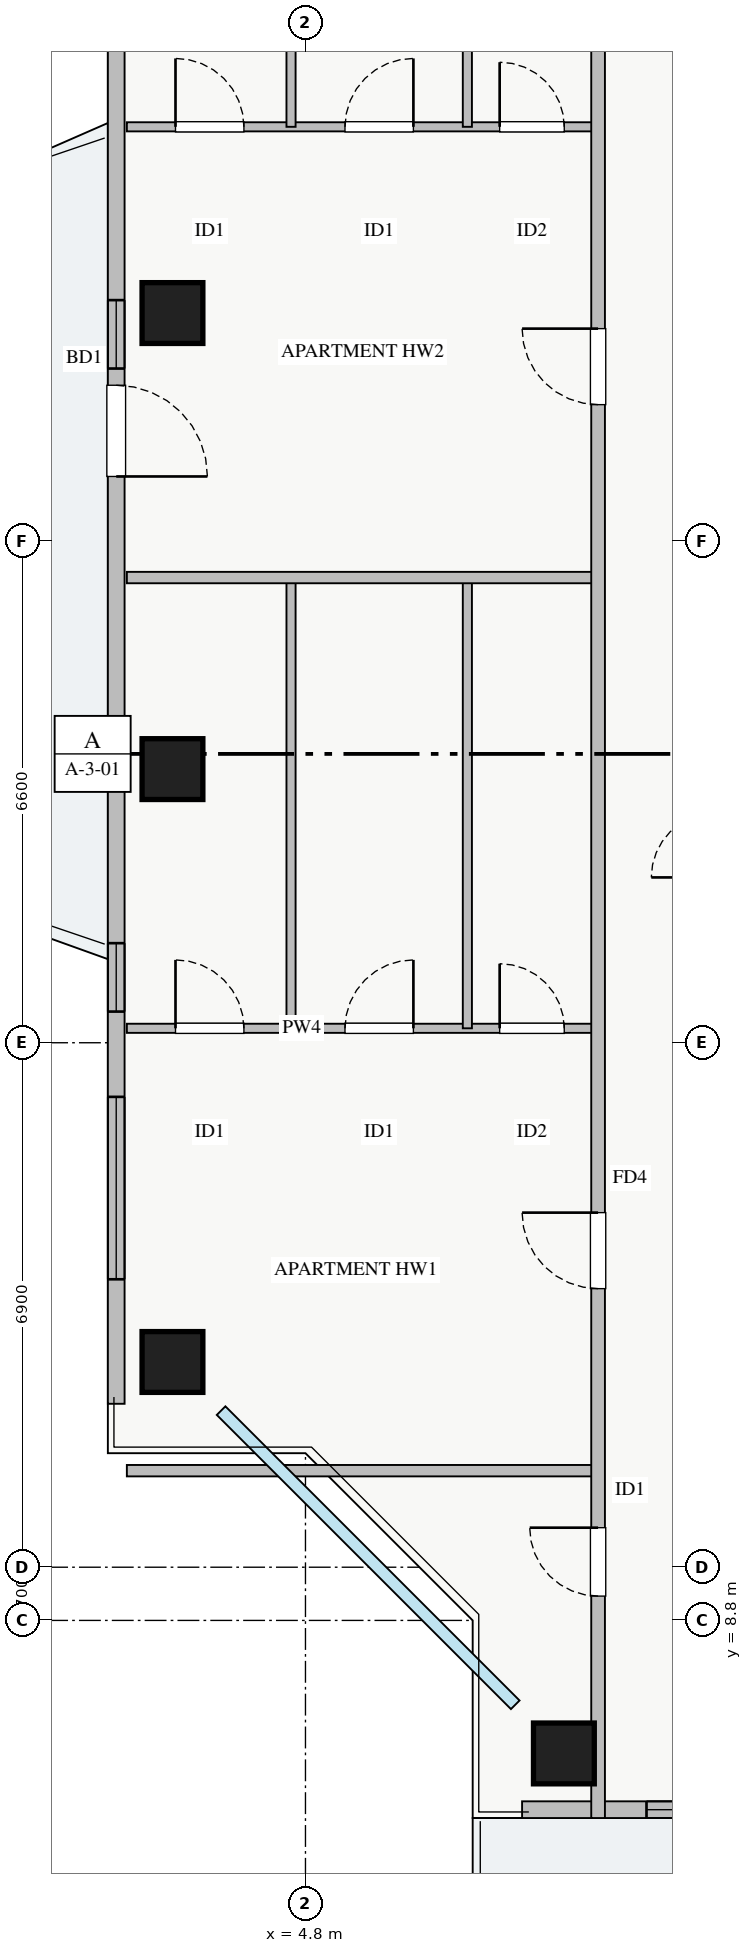
"""IFC4 building model, lengths in metres.
Left out: names, types, materials, properties, quantities, classifications, styles, units other than length and angle.
Written with IfcOpenShell. Run it as: python <this file> out.ifc"""

import sys

from ifc_helpers import new_model, si_unit, direction, frame, frame_2d, origin, origin_2d, place, context, subcontext, project, spatial, rectangle, extrude, source, transform, mapped, element, fill, save


model = new_model("IFC4")
c1 = context("Model", 3, precision=1e-05, world=origin(), true_north=direction((0.0, 1.0)))
c2 = subcontext(c1, "Body", "Model", "MODEL_VIEW")
j1 = project(units=[si_unit("LENGTHUNIT", "METRE"), si_unit("PLANEANGLEUNIT", "RADIAN")], contexts=[c1])
p1 = place(None, origin())
s1 = spatial("IfcSite", under=j1, at=p1, CompositionType="ELEMENT")
p2 = place(p1, origin())
s2 = spatial("IfcBuilding", under=s1, at=p2, CompositionType="ELEMENT")
p3 = place(p2, frame((0.0, 0.0, 190.5)))
s3 = spatial("IfcBuildingStorey", under=s2, at=p3, CompositionType="ELEMENT", Elevation=190.5)
m1 = source(origin(), c2, "Body", "SweptSolid", [
    extrude(rectangle(XDim=0.8, YDim=0.8, at=origin_2d()), origin(), (0.0, 0.0, 1.0), 3.25),
])
for number, where, z_axis, x_axis in (
    (1, (8.2, 7.05, 0.0), (0.0, 0.0, 1.0), (1.0, 0.0, 0.0)),
    (2, (3.05, 26.0, 0.0), (0.0, 0.0, 1.0), (1.0, 0.0, 0.0)),
    (3, (3.05, 20.0, 0.0), (0.0, 0.0, 1.0), (1.0, 0.0, 0.0)),
    (4, (3.05, 12.2, 0.0), (0.0, 0.0, 1.0), (1.0, 0.0, 0.0)),
):
    element("IfcColumn", number, at=place(p3, frame(where, z_axis=z_axis, x_axis=x_axis)), inside=s3, PredefinedType="COLUMN", context=c2, shape_type="MappedRepresentation", body=[
        mapped(m1, transform((0.0, 0.0, 0.0), x_axis=(1.0, 0.0, 0.0), y_axis=(0.0, 1.0, 0.0), z_axis=(0.0, 0.0, 1.0), scale=1.0)),
    ])
p4 = place(p3, frame((7.65, 6.31, 0.0), z_axis=(0.0, 0.0, 1.0), x_axis=(1.0, 0.0, 0.0)))
e5 = element("IfcWall", 5, at=p4, inside=s3, PredefinedType="STANDARD", context=c2, shape_type="SweptSolid", body=[
    extrude(rectangle(XDim=22.7, YDim=0.22, at=frame_2d((11.35, 0.0))), origin(), (0.0, 0.0, 1.0), 2.61),
])
p5 = place(p4, frame((12.2, 0.0, 0.0)))
e6 = element("IfcOpeningElement", 6, at=p5, cuts=e5, PredefinedType="OPENING", context=c2, shape_type="SweptSolid", body=[
    extrude(rectangle(XDim=1.2, YDim=2.1, at=frame_2d((0.6, 1.05))), frame((0.0, 0.12, 0.0), z_axis=(0.0, -1.0, 0.0), x_axis=(1.0, 0.0, 0.0)), (0.0, 0.0, 1.0), 0.24),
])
p6 = place(p4, frame((1.637, 0.0, 0.9)))
e7 = element("IfcOpeningElement", 7, at=p6, cuts=e5, PredefinedType="OPENING", context=c2, shape_type="SweptSolid", body=[
    extrude(rectangle(XDim=2.4, YDim=1.48, at=frame_2d((1.2, 0.74))), frame((0.0, 0.12, 0.0), z_axis=(0.0, -1.0, 0.0), x_axis=(1.0, 0.0, 0.0)), (0.0, 0.0, 1.0), 0.24),
])
p7 = place(p4, frame((7.612, 0.0, 0.9)))
e8 = element("IfcOpeningElement", 8, at=p7, cuts=e5, PredefinedType="OPENING", context=c2, shape_type="SweptSolid", body=[
    extrude(rectangle(XDim=1.8, YDim=1.45, at=frame_2d((0.9, 0.725))), frame((0.0, 0.12, 0.0), z_axis=(0.0, -1.0, 0.0), x_axis=(1.0, 0.0, 0.0)), (0.0, 0.0, 1.0), 0.24),
])
p8 = place(p4, frame((19.788, 0.0, 0.9)))
e9 = element("IfcOpeningElement", 9, at=p8, cuts=e5, PredefinedType="OPENING", context=c2, shape_type="SweptSolid", body=[
    extrude(rectangle(XDim=2.1, YDim=1.5, at=frame_2d((1.05, 0.75))), frame((0.0, 0.12, 0.0), z_axis=(0.0, -1.0, 0.0), x_axis=(1.0, 0.0, 0.0)), (0.0, 0.0, 1.0), 0.24),
])
p9 = place(p3, frame((2.31, 11.65, 0.0), z_axis=(0.0, 0.0, 1.0), x_axis=(0.0, 1.0, 0.0)))
e10 = element("IfcWall", 10, at=p9, inside=s3, PredefinedType="STANDARD", context=c2, shape_type="SweptSolid", body=[
    extrude(rectangle(XDim=22.7, YDim=0.22, at=frame_2d((11.35, 0.0))), origin(), (0.0, 0.0, 1.0), 2.61),
])
p10 = place(p9, frame((12.2, 0.0, 0.0)))
e11 = element("IfcOpeningElement", 11, at=p10, cuts=e10, PredefinedType="OPENING", context=c2, shape_type="SweptSolid", body=[
    extrude(rectangle(XDim=1.2, YDim=2.1, at=frame_2d((0.6, 1.05))), frame((0.0, 0.12, 0.0), z_axis=(0.0, -1.0, 0.0), x_axis=(1.0, 0.0, 0.0)), (0.0, 0.0, 1.0), 0.24),
])
p11 = place(p9, frame((1.638, 0.0, 0.9)))
e12 = element("IfcOpeningElement", 12, at=p11, cuts=e10, PredefinedType="OPENING", context=c2, shape_type="SweptSolid", body=[
    extrude(rectangle(XDim=2.4, YDim=1.48, at=frame_2d((1.2, 0.74))), frame((0.0, 0.12, 0.0), z_axis=(0.0, -1.0, 0.0), x_axis=(1.0, 0.0, 0.0)), (0.0, 0.0, 1.0), 0.24),
])
p12 = place(p9, frame((18.813, 0.0, 0.9)))
e13 = element("IfcOpeningElement", 13, at=p12, cuts=e10, PredefinedType="OPENING", context=c2, shape_type="SweptSolid", body=[
    extrude(rectangle(XDim=2.1, YDim=1.48, at=frame_2d((1.05, 0.74))), frame((0.0, 0.12, 0.0), z_axis=(0.0, -1.0, 0.0), x_axis=(1.0, 0.0, 0.0)), (0.0, 0.0, 1.0), 0.24),
])
p13 = place(p9, frame((5.16, 0.0, 0.9)))
e14 = element("IfcOpeningElement", 14, at=p13, cuts=e10, PredefinedType="OPENING", context=c2, shape_type="SweptSolid", body=[
    extrude(rectangle(XDim=0.9, YDim=1.2, at=frame_2d((0.45, 0.6))), frame((0.0, 0.12, 0.0), z_axis=(0.0, -1.0, 0.0), x_axis=(1.0, 0.0, 0.0)), (0.0, 0.0, 1.0), 0.24),
])
p14 = place(p9, frame((13.62, 0.0, 0.9)))
e15 = element("IfcOpeningElement", 15, at=p14, cuts=e10, PredefinedType="OPENING", context=c2, shape_type="SweptSolid", body=[
    extrude(rectangle(XDim=0.9, YDim=1.2, at=frame_2d((0.45, 0.6))), frame((0.0, 0.12, 0.0), z_axis=(0.0, -1.0, 0.0), x_axis=(1.0, 0.0, 0.0)), (0.0, 0.0, 1.0), 0.24),
])
p15 = place(p3, frame((2.45, 10.77, 0.0), z_axis=(0.0, 0.0, 1.0), x_axis=(1.0, 0.0, 0.0)))
e16 = element("IfcWall", 16, at=p15, inside=s3, PredefinedType="PARTITIONING", context=c2, shape_type="SweptSolid", body=[
    extrude(rectangle(XDim=6.2, YDim=0.15, at=frame_2d((3.1, 0.0))), origin(), (0.0, 0.0, 1.0), 3.07),
])
p16 = place(p3, frame((2.45, 16.59, 0.0), z_axis=(0.0, 0.0, 1.0), x_axis=(1.0, 0.0, 0.0)))
e17 = element("IfcWall", 17, at=p16, inside=s3, PredefinedType="PLUMBINGWALL", context=c2, shape_type="SweptSolid", body=[
    extrude(rectangle(XDim=6.2, YDim=0.12, at=frame_2d((3.1, 0.0))), origin(), (0.0, 0.0, 1.0), 3.07),
])
p17 = place(p16, frame((0.64, 0.0, 0.0)))
e18 = element("IfcOpeningElement", 18, at=p17, cuts=e17, PredefinedType="OPENING", context=c2, shape_type="SweptSolid", body=[
    extrude(rectangle(XDim=0.9, YDim=2.05, at=frame_2d((0.45, 1.025))), frame((0.0, 0.07, 0.0), z_axis=(0.0, -1.0, 0.0), x_axis=(1.0, 0.0, 0.0)), (0.0, 0.0, 1.0), 0.14),
])
p18 = place(p16, frame((2.87, 0.0, 0.0)))
e19 = element("IfcOpeningElement", 19, at=p18, cuts=e17, PredefinedType="OPENING", context=c2, shape_type="SweptSolid", body=[
    extrude(rectangle(XDim=0.9, YDim=2.05, at=frame_2d((0.45, 1.025))), frame((0.0, 0.07, 0.0), z_axis=(0.0, -1.0, 0.0), x_axis=(1.0, 0.0, 0.0)), (0.0, 0.0, 1.0), 0.14),
])
p19 = place(p16, frame((4.905, 0.0, 0.0)))
e20 = element("IfcOpeningElement", 20, at=p19, cuts=e17, PredefinedType="OPENING", context=c2, shape_type="SweptSolid", body=[
    extrude(rectangle(XDim=0.85, YDim=2.05, at=frame_2d((0.425, 1.025))), frame((0.0, 0.07, 0.0), z_axis=(0.0, -1.0, 0.0), x_axis=(1.0, 0.0, 0.0)), (0.0, 0.0, 1.0), 0.14),
])
for number, where, z_axis, x_axis in (
    (21, (4.61, 16.59, 0.0), (0.0, 0.0, 1.0), (0.0, 1.0, 0.0)),
    (22, (6.93, 16.59, 0.0), (0.0, 0.0, 1.0), (0.0, 1.0, 0.0)),
):
    element("IfcWall", number, at=place(p3, frame(where, z_axis=z_axis, x_axis=x_axis)), inside=s3, PredefinedType="PLUMBINGWALL", context=c2, shape_type="SweptSolid", body=[
        extrude(rectangle(XDim=5.93, YDim=0.12, at=frame_2d((2.965, 0.0))), origin(), (0.0, 0.0, 1.0), 3.07),
    ])
p20 = place(p3, frame((2.45, 28.45, 0.0), z_axis=(0.0, 0.0, 1.0), x_axis=(1.0, 0.0, 0.0)))
e23 = element("IfcWall", 23, at=p20, inside=s3, PredefinedType="PLUMBINGWALL", context=c2, shape_type="SweptSolid", body=[
    extrude(rectangle(XDim=6.2, YDim=0.12, at=frame_2d((3.1, 0.0))), origin(), (0.0, 0.0, 1.0), 3.07),
])
p21 = place(p20, frame((0.64, 0.0, 0.0)))
e24 = element("IfcOpeningElement", 24, at=p21, cuts=e23, PredefinedType="OPENING", context=c2, shape_type="SweptSolid", body=[
    extrude(rectangle(XDim=0.9, YDim=2.05, at=frame_2d((0.45, 1.025))), frame((0.0, 0.07, 0.0), z_axis=(0.0, -1.0, 0.0), x_axis=(1.0, 0.0, 0.0)), (0.0, 0.0, 1.0), 0.14),
])
p22 = place(p20, frame((2.87, 0.0, 0.0)))
e25 = element("IfcOpeningElement", 25, at=p22, cuts=e23, PredefinedType="OPENING", context=c2, shape_type="SweptSolid", body=[
    extrude(rectangle(XDim=0.9, YDim=2.05, at=frame_2d((0.45, 1.025))), frame((0.0, 0.07, 0.0), z_axis=(0.0, -1.0, 0.0), x_axis=(1.0, 0.0, 0.0)), (0.0, 0.0, 1.0), 0.14),
])
p23 = place(p20, frame((4.905, 0.0, 0.0)))
e26 = element("IfcOpeningElement", 26, at=p23, cuts=e23, PredefinedType="OPENING", context=c2, shape_type="SweptSolid", body=[
    extrude(rectangle(XDim=0.85, YDim=2.05, at=frame_2d((0.425, 1.025))), frame((0.0, 0.07, 0.0), z_axis=(0.0, -1.0, 0.0), x_axis=(1.0, 0.0, 0.0)), (0.0, 0.0, 1.0), 0.14),
])
for number, where, z_axis, x_axis in (
    (27, (4.61, 28.45, 0.0), (0.0, 0.0, 1.0), (0.0, 1.0, 0.0)),
    (28, (6.93, 28.45, 0.0), (0.0, 0.0, 1.0), (0.0, 1.0, 0.0)),
):
    element("IfcWall", number, at=place(p3, frame(where, z_axis=z_axis, x_axis=x_axis)), inside=s3, PredefinedType="PLUMBINGWALL", context=c2, shape_type="SweptSolid", body=[
        extrude(rectangle(XDim=6.43, YDim=0.12, at=frame_2d((3.215, 0.0))), origin(), (0.0, 0.0, 1.0), 3.07),
    ])
p24 = place(p3, frame((2.45, 22.52, 0.0), z_axis=(0.0, 0.0, 1.0), x_axis=(1.0, 0.0, 0.0)))
e29 = element("IfcWall", 29, at=p24, inside=s3, PredefinedType="PARTITIONING", context=c2, shape_type="SweptSolid", body=[
    extrude(rectangle(XDim=6.2, YDim=0.15, at=frame_2d((3.1, 0.0))), origin(), (0.0, 0.0, 1.0), 3.07),
])
p25 = place(p3, frame((8.65, 6.2, 0.0), z_axis=(0.0, 0.0, 1.0), x_axis=(0.0, 1.0, 0.0)))
e30 = element("IfcWall", 30, at=p25, inside=s3, PredefinedType="PARTITIONING", context=c2, shape_type="SweptSolid", body=[
    extrude(rectangle(XDim=33.6, YDim=0.18, at=frame_2d((16.8, 0.0))), origin(), (0.0, 0.0, 1.0), 3.07),
])
p26 = place(p25, frame((29.605, 0.0, 0.0)))
e31 = element("IfcOpeningElement", 31, at=p26, cuts=e30, PredefinedType="OPENING", context=c2, shape_type="SweptSolid", body=[
    extrude(rectangle(XDim=0.9, YDim=2.05, at=frame_2d((0.45, 1.025))), frame((0.0, 0.1, 0.0), z_axis=(0.0, -1.0, 0.0), x_axis=(1.0, 0.0, 0.0)), (0.0, 0.0, 1.0), 0.2),
])
p27 = place(p25, frame((2.92, 0.0, 0.0)))
e32 = element("IfcOpeningElement", 32, at=p27, cuts=e30, PredefinedType="OPENING", context=c2, shape_type="SweptSolid", body=[
    extrude(rectangle(XDim=0.9, YDim=2.05, at=frame_2d((0.45, 1.025))), frame((0.0, 0.1, 0.0), z_axis=(0.0, -1.0, 0.0), x_axis=(1.0, 0.0, 0.0)), (0.0, 0.0, 1.0), 0.2),
])
p28 = place(p25, frame((6.965, 0.0, 0.0)))
e33 = element("IfcOpeningElement", 33, at=p28, cuts=e30, PredefinedType="OPENING", context=c2, shape_type="SweptSolid", body=[
    extrude(rectangle(XDim=1.0, YDim=2.05, at=frame_2d((0.5, 1.025))), frame((0.0, 0.1, 0.0), z_axis=(0.0, -1.0, 0.0), x_axis=(1.0, 0.0, 0.0)), (0.0, 0.0, 1.0), 0.2),
])
p29 = place(p25, frame((18.595, 0.0, 0.0)))
e34 = element("IfcOpeningElement", 34, at=p29, cuts=e30, PredefinedType="OPENING", context=c2, shape_type="SweptSolid", body=[
    extrude(rectangle(XDim=1.0, YDim=2.05, at=frame_2d((0.5, 1.025))), frame((0.0, 0.1, 0.0), z_axis=(0.0, -1.0, 0.0), x_axis=(1.0, 0.0, 0.0)), (0.0, 0.0, 1.0), 0.2),
])
m2 = source(origin(), c2, "Body", "SweptSolid", [
    extrude(rectangle(XDim=2.4, YDim=1.48, at=frame_2d((1.2, 0.74))), frame((0.0, 0.03, 0.0), z_axis=(0.0, -1.0, 0.0), x_axis=(1.0, 0.0, 0.0)), (0.0, 0.0, 1.0), 0.06),
])
p30 = place(p6, origin())
e35 = element("IfcWindow", 35, at=p30, inside=s3, PartitioningType="TRIPLE_PANEL_VERTICAL", PredefinedType="WINDOW", context=c2, shape_type="MappedRepresentation", body=[
    mapped(m2, transform((0.0, 0.0, 0.0), x_axis=(1.0, 0.0, 0.0), y_axis=(0.0, 1.0, 0.0), z_axis=(0.0, 0.0, 1.0), scale=1.0)),
])
fill(e7, e35)
m3 = source(origin(), c2, "Body", "SweptSolid", [
    extrude(rectangle(XDim=1.2, YDim=2.1, at=frame_2d((0.6, 1.05))), frame((0.0, 0.025, 0.0), z_axis=(0.0, -1.0, 0.0), x_axis=(1.0, 0.0, 0.0)), (0.0, 0.0, 1.0), 0.05),
])
p31 = place(p10, frame((1.2, 0.0, 0.0), z_axis=(0.0, 0.0, 1.0), x_axis=(-1.0, 0.0, 0.0)))
e36 = element("IfcDoor", 36, at=p31, inside=s3, OperationType="SINGLE_SWING_LEFT", PredefinedType="DOOR", context=c2, shape_type="MappedRepresentation", body=[
    mapped(m3, transform((0.0, 0.0, 0.0), x_axis=(1.0, 0.0, 0.0), y_axis=(0.0, 1.0, 0.0), z_axis=(0.0, 0.0, 1.0), scale=1.0)),
])
fill(e11, e36)
p32 = place(p11, origin())
e37 = element("IfcWindow", 37, at=p32, inside=s3, PartitioningType="TRIPLE_PANEL_VERTICAL", PredefinedType="WINDOW", context=c2, shape_type="MappedRepresentation", body=[
    mapped(m2, transform((0.0, 0.0, 0.0), x_axis=(1.0, 0.0, 0.0), y_axis=(0.0, 1.0, 0.0), z_axis=(0.0, 0.0, 1.0), scale=1.0)),
])
fill(e12, e37)
m4 = source(origin(), c2, "Body", "SweptSolid", [
    extrude(rectangle(XDim=0.9, YDim=2.05, at=frame_2d((0.45, 1.025))), frame((0.0, 0.025, 0.0), z_axis=(0.0, -1.0, 0.0), x_axis=(1.0, 0.0, 0.0)), (0.0, 0.0, 1.0), 0.05),
])
p33 = place(p17, origin())
e38 = element("IfcDoor", 38, at=p33, inside=s3, OperationType="SINGLE_SWING_LEFT", PredefinedType="DOOR", context=c2, shape_type="MappedRepresentation", body=[
    mapped(m4, transform((0.0, 0.0, 0.0), x_axis=(1.0, 0.0, 0.0), y_axis=(0.0, 1.0, 0.0), z_axis=(0.0, 0.0, 1.0), scale=1.0)),
])
fill(e18, e38)
p34 = place(p18, origin())
e39 = element("IfcDoor", 39, at=p34, inside=s3, OperationType="SINGLE_SWING_RIGHT", PredefinedType="DOOR", context=c2, shape_type="MappedRepresentation", body=[
    mapped(m4, transform((0.0, 0.0, 0.0), x_axis=(1.0, 0.0, 0.0), y_axis=(0.0, 1.0, 0.0), z_axis=(0.0, 0.0, 1.0), scale=1.0)),
])
fill(e19, e39)
m5 = source(origin(), c2, "Body", "SweptSolid", [
    extrude(rectangle(XDim=0.85, YDim=2.05, at=frame_2d((0.425, 1.025))), frame((0.0, 0.025, 0.0), z_axis=(0.0, -1.0, 0.0), x_axis=(1.0, 0.0, 0.0)), (0.0, 0.0, 1.0), 0.05),
])
p35 = place(p19, origin())
e40 = element("IfcDoor", 40, at=p35, inside=s3, OperationType="SINGLE_SWING_LEFT", PredefinedType="DOOR", context=c2, shape_type="MappedRepresentation", body=[
    mapped(m5, transform((0.0, 0.0, 0.0), x_axis=(1.0, 0.0, 0.0), y_axis=(0.0, 1.0, 0.0), z_axis=(0.0, 0.0, 1.0), scale=1.0)),
])
fill(e20, e40)
p36 = place(p21, origin())
e41 = element("IfcDoor", 41, at=p36, inside=s3, OperationType="SINGLE_SWING_LEFT", PredefinedType="DOOR", context=c2, shape_type="MappedRepresentation", body=[
    mapped(m4, transform((0.0, 0.0, 0.0), x_axis=(1.0, 0.0, 0.0), y_axis=(0.0, 1.0, 0.0), z_axis=(0.0, 0.0, 1.0), scale=1.0)),
])
fill(e24, e41)
p37 = place(p22, origin())
e42 = element("IfcDoor", 42, at=p37, inside=s3, OperationType="SINGLE_SWING_RIGHT", PredefinedType="DOOR", context=c2, shape_type="MappedRepresentation", body=[
    mapped(m4, transform((0.0, 0.0, 0.0), x_axis=(1.0, 0.0, 0.0), y_axis=(0.0, 1.0, 0.0), z_axis=(0.0, 0.0, 1.0), scale=1.0)),
])
fill(e25, e42)
p38 = place(p23, origin())
e43 = element("IfcDoor", 43, at=p38, inside=s3, OperationType="SINGLE_SWING_LEFT", PredefinedType="DOOR", context=c2, shape_type="MappedRepresentation", body=[
    mapped(m5, transform((0.0, 0.0, 0.0), x_axis=(1.0, 0.0, 0.0), y_axis=(0.0, 1.0, 0.0), z_axis=(0.0, 0.0, 1.0), scale=1.0)),
])
fill(e26, e43)
p39 = place(p27, origin())
e44 = element("IfcDoor", 44, at=p39, inside=s3, OperationType="SINGLE_SWING_RIGHT", PredefinedType="DOOR", context=c2, shape_type="MappedRepresentation", body=[
    mapped(m4, transform((0.0, 0.0, 0.0), x_axis=(1.0, 0.0, 0.0), y_axis=(0.0, 1.0, 0.0), z_axis=(0.0, 0.0, 1.0), scale=1.0)),
])
fill(e32, e44)
m6 = source(origin(), c2, "Body", "SweptSolid", [
    extrude(rectangle(XDim=1.0, YDim=2.05, at=frame_2d((0.5, 1.025))), frame((0.0, 0.025, 0.0), z_axis=(0.0, -1.0, 0.0), x_axis=(1.0, 0.0, 0.0)), (0.0, 0.0, 1.0), 0.05),
])
p40 = place(p28, origin())
e45 = element("IfcDoor", 45, at=p40, inside=s3, OperationType="SINGLE_SWING_RIGHT", PredefinedType="DOOR", context=c2, shape_type="MappedRepresentation", body=[
    mapped(m6, transform((0.0, 0.0, 0.0), x_axis=(1.0, 0.0, 0.0), y_axis=(0.0, 1.0, 0.0), z_axis=(0.0, 0.0, 1.0), scale=1.0)),
])
fill(e33, e45)
p41 = place(p29, origin())
e46 = element("IfcDoor", 46, at=p41, inside=s3, OperationType="SINGLE_SWING_RIGHT", PredefinedType="DOOR", context=c2, shape_type="MappedRepresentation", body=[
    mapped(m6, transform((0.0, 0.0, 0.0), x_axis=(1.0, 0.0, 0.0), y_axis=(0.0, 1.0, 0.0), z_axis=(0.0, 0.0, 1.0), scale=1.0)),
])
fill(e34, e46)
m7 = source(origin(), c2, "Body", "SweptSolid", [
    extrude(rectangle(XDim=0.9, YDim=1.2, at=frame_2d((0.45, 0.6))), frame((0.0, 0.03, 0.0), z_axis=(0.0, -1.0, 0.0), x_axis=(1.0, 0.0, 0.0)), (0.0, 0.0, 1.0), 0.06),
])
p42 = place(p13, origin())
e47 = element("IfcWindow", 47, at=p42, inside=s3, PartitioningType="SINGLE_PANEL", PredefinedType="WINDOW", context=c2, shape_type="MappedRepresentation", body=[
    mapped(m7, transform((0.0, 0.0, 0.0), x_axis=(1.0, 0.0, 0.0), y_axis=(0.0, 1.0, 0.0), z_axis=(0.0, 0.0, 1.0), scale=1.0)),
])
fill(e14, e47)
p43 = place(p14, origin())
e48 = element("IfcWindow", 48, at=p43, inside=s3, PartitioningType="SINGLE_PANEL", PredefinedType="WINDOW", context=c2, shape_type="MappedRepresentation", body=[
    mapped(m7, transform((0.0, 0.0, 0.0), x_axis=(1.0, 0.0, 0.0), y_axis=(0.0, 1.0, 0.0), z_axis=(0.0, 0.0, 1.0), scale=1.0)),
])
fill(e15, e48)
save(model, sys.argv[1])
